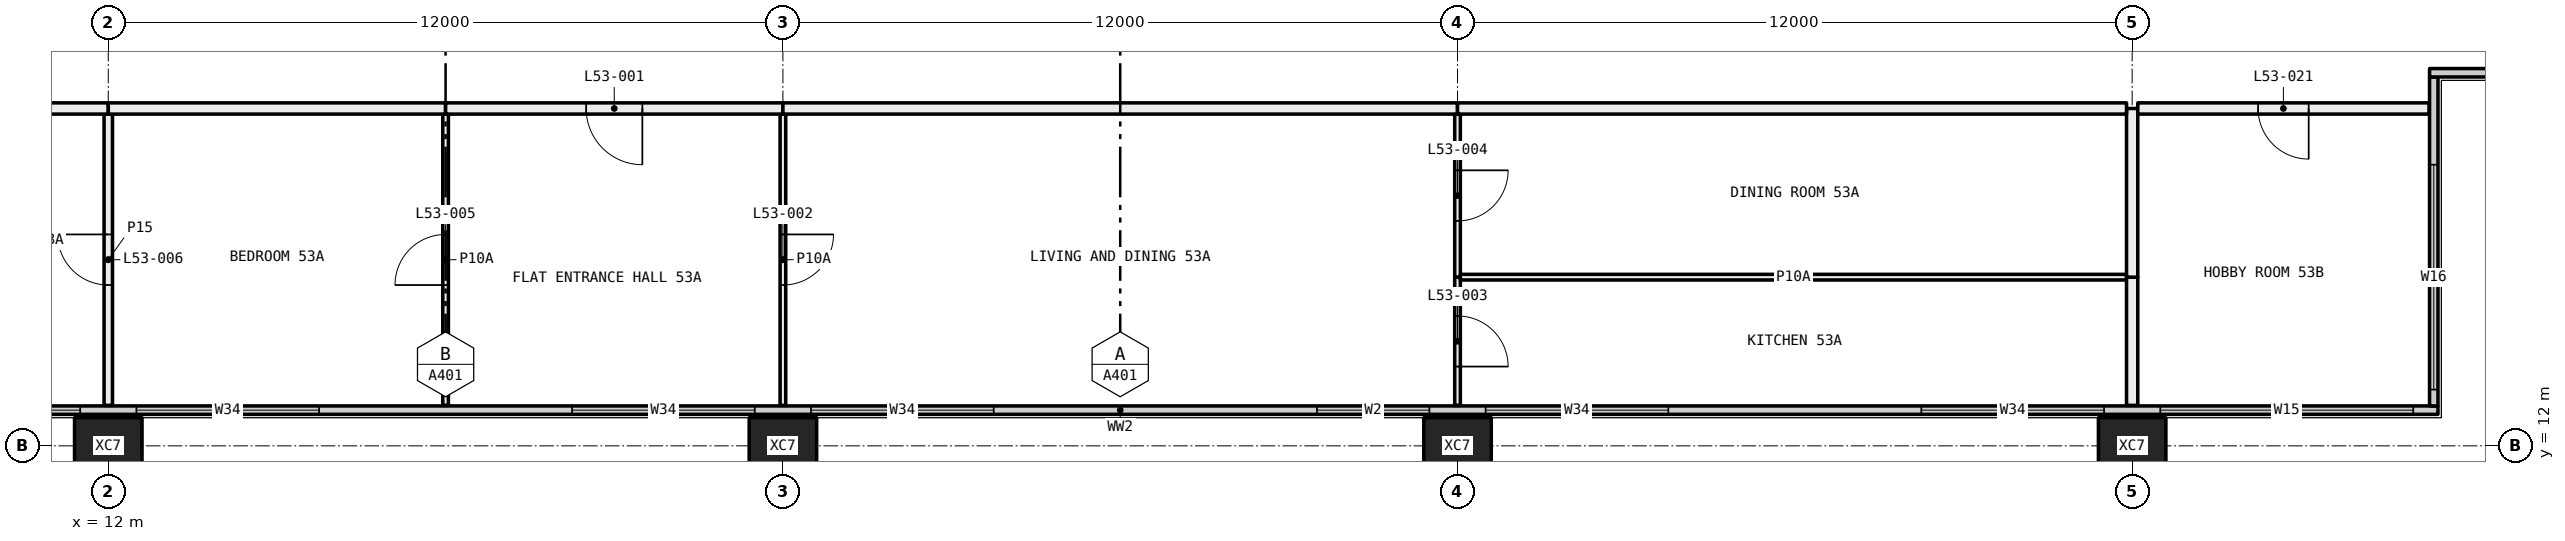
"""IFC4 building model, lengths in metres.
Left out: names, types, materials, properties, quantities, classifications, styles, units other than length and angle.
Written with IfcOpenShell. Run it as: python <this file> out.ifc"""

import sys

from ifc_helpers import new_model, si_unit, direction, frame, frame_2d, origin, origin_2d, place, context, subcontext, project, spatial, rectangle, hollow_rectangle, extrude, element, fill, save


model = new_model("IFC4")
c1 = context("Model", 3, precision=1e-05, world=origin(), true_north=direction((0.0, 1.0)))
c2 = subcontext(c1, "Body", "Model", "MODEL_VIEW")
j1 = project(units=[si_unit("LENGTHUNIT", "METRE"), si_unit("PLANEANGLEUNIT", "RADIAN")], contexts=[c1])
p1 = place(None, origin())
s1 = spatial("IfcSite", under=j1, at=p1, CompositionType="ELEMENT")
p2 = place(p1, origin())
s2 = spatial("IfcBuilding", under=s1, at=p2, CompositionType="ELEMENT")
p3 = place(p2, frame((0.0, 0.0, 199.65)))
s3 = spatial("IfcBuildingStorey", under=s2, at=p3, CompositionType="ELEMENT", Elevation=199.65)
for number, where, z_axis, x_axis in (
    (1, (12.0, 12.0, -0.4), (0.0, 0.0, 1.0), (1.0, 0.0, 0.0)),
    (2, (24.0, 12.0, -0.4), (0.0, 0.0, 1.0), (1.0, 0.0, 0.0)),
    (3, (36.0, 12.0, -0.4), (0.0, 0.0, 1.0), (1.0, 0.0, 0.0)),
    (4, (48.0, 12.0, -0.4), (0.0, 0.0, 1.0), (1.0, 0.0, 0.0)),
):
    element("IfcColumn", number, at=place(p3, frame(where, z_axis=z_axis, x_axis=x_axis)), inside=s3, PredefinedType="COLUMN", context=c2, shape_type="SweptSolid", body=[
        extrude(hollow_rectangle(XDim=1.2, YDim=1.0, WallThickness=0.045, at=origin_2d()), origin(), (0.0, 0.0, 1.0), 3.45),
    ])
p4 = place(p3, frame((6.56, 12.635, 0.0), z_axis=(0.0, 0.0, 1.0), x_axis=(1.0, 0.0, 0.0)))
e5 = element("IfcWall", 5, at=p4, inside=s3, PredefinedType="ELEMENTEDWALL", context=c2, shape_type="SweptSolid", body=[
    extrude(rectangle(XDim=46.88, YDim=0.15, at=frame_2d((23.44, 0.0))), origin(), (0.0, 0.0, 1.0), 3.05),
])
p5 = place(p4, frame((0.44, 0.0, 0.45)))
e6 = element("IfcOpeningElement", 6, at=p5, cuts=e5, PredefinedType="OPENING", context=c2, shape_type="SweptSolid", body=[
    extrude(rectangle(XDim=4.5, YDim=2.55, at=frame_2d((2.25, 1.275))), frame((0.0, 0.085, 0.0), z_axis=(0.0, -1.0, 0.0), x_axis=(1.0, 0.0, 0.0)), (0.0, 0.0, 1.0), 0.17),
])
p6 = place(p4, frame((5.94, 0.0, 0.45)))
e7 = element("IfcOpeningElement", 7, at=p6, cuts=e5, PredefinedType="OPENING", context=c2, shape_type="SweptSolid", body=[
    extrude(rectangle(XDim=3.25, YDim=2.55, at=frame_2d((1.625, 1.275))), frame((0.0, 0.085, 0.0), z_axis=(0.0, -1.0, 0.0), x_axis=(1.0, 0.0, 0.0)), (0.0, 0.0, 1.0), 0.17),
])
p7 = place(p4, frame((13.69, 0.0, 0.45)))
e8 = element("IfcOpeningElement", 8, at=p7, cuts=e5, PredefinedType="OPENING", context=c2, shape_type="SweptSolid", body=[
    extrude(rectangle(XDim=3.25, YDim=2.55, at=frame_2d((1.625, 1.275))), frame((0.0, 0.085, 0.0), z_axis=(0.0, -1.0, 0.0), x_axis=(1.0, 0.0, 0.0)), (0.0, 0.0, 1.0), 0.17),
])
p8 = place(p4, frame((17.94, 0.0, 0.45)))
e9 = element("IfcOpeningElement", 9, at=p8, cuts=e5, PredefinedType="OPENING", context=c2, shape_type="SweptSolid", body=[
    extrude(rectangle(XDim=3.25, YDim=2.55, at=frame_2d((1.625, 1.275))), frame((0.0, 0.085, 0.0), z_axis=(0.0, -1.0, 0.0), x_axis=(1.0, 0.0, 0.0)), (0.0, 0.0, 1.0), 0.17),
])
p9 = place(p4, frame((26.94, 0.0, 0.45)))
e10 = element("IfcOpeningElement", 10, at=p9, cuts=e5, PredefinedType="OPENING", context=c2, shape_type="SweptSolid", body=[
    extrude(rectangle(XDim=2.0, YDim=2.55, at=frame_2d((1.0, 1.275))), frame((0.0, 0.085, 0.0), z_axis=(0.0, -1.0, 0.0), x_axis=(1.0, 0.0, 0.0)), (0.0, 0.0, 1.0), 0.17),
])
p10 = place(p4, frame((29.94, 0.0, 0.45)))
e11 = element("IfcOpeningElement", 11, at=p10, cuts=e5, PredefinedType="OPENING", context=c2, shape_type="SweptSolid", body=[
    extrude(rectangle(XDim=3.25, YDim=2.55, at=frame_2d((1.625, 1.275))), frame((0.0, 0.085, 0.0), z_axis=(0.0, -1.0, 0.0), x_axis=(1.0, 0.0, 0.0)), (0.0, 0.0, 1.0), 0.17),
])
p11 = place(p4, frame((37.69, 0.0, 0.45)))
e12 = element("IfcOpeningElement", 12, at=p11, cuts=e5, PredefinedType="OPENING", context=c2, shape_type="SweptSolid", body=[
    extrude(rectangle(XDim=3.25, YDim=2.55, at=frame_2d((1.625, 1.275))), frame((0.0, 0.085, 0.0), z_axis=(0.0, -1.0, 0.0), x_axis=(1.0, 0.0, 0.0)), (0.0, 0.0, 1.0), 0.17),
])
p12 = place(p4, frame((41.94, 0.0, 0.45)))
e13 = element("IfcOpeningElement", 13, at=p12, cuts=e5, PredefinedType="OPENING", context=c2, shape_type="SweptSolid", body=[
    extrude(rectangle(XDim=4.5, YDim=2.55, at=frame_2d((2.25, 1.275))), frame((0.0, 0.085, 0.0), z_axis=(0.0, -1.0, 0.0), x_axis=(1.0, 0.0, 0.0)), (0.0, 0.0, 1.0), 0.17),
])
p13 = place(p3, frame((53.365, 12.71, 0.0), z_axis=(0.0, 0.0, 1.0), x_axis=(0.0, 1.0, 0.0)))
e14 = element("IfcWall", 14, at=p13, inside=s3, PredefinedType="ELEMENTEDWALL", context=c2, shape_type="SweptSolid", body=[
    extrude(rectangle(XDim=5.85, YDim=0.15, at=frame_2d((2.925, 0.0))), origin(), (0.0, 0.0, 1.0), 3.05),
])
p14 = place(p13, frame((0.29, 0.0, 0.45)))
e15 = element("IfcOpeningElement", 15, at=p14, cuts=e14, PredefinedType="OPENING", context=c2, shape_type="SweptSolid", body=[
    extrude(rectangle(XDim=4.0, YDim=2.55, at=frame_2d((2.0, 1.275))), frame((0.0, 0.085, 0.0), z_axis=(0.0, -1.0, 0.0), x_axis=(1.0, 0.0, 0.0)), (0.0, 0.0, 1.0), 0.17),
])
p15 = place(p3, frame((53.29, 18.635, 0.0), z_axis=(0.0, 0.0, 1.0), x_axis=(1.0, 0.0, 0.0)))
e16 = element("IfcWall", 16, at=p15, inside=s3, PredefinedType="ELEMENTEDWALL", context=c2, shape_type="SweptSolid", body=[
    extrude(rectangle(XDim=6.15, YDim=0.15, at=frame_2d((3.075, 0.0))), origin(), (0.0, 0.0, 1.0), 3.05),
])
p16 = place(p15, frame((1.71, 0.0, 0.45)))
e17 = element("IfcOpeningElement", 17, at=p16, cuts=e16, PredefinedType="OPENING", context=c2, shape_type="SweptSolid", body=[
    extrude(rectangle(XDim=4.0, YDim=2.55, at=frame_2d((2.0, 1.275))), frame((0.0, 0.085, 0.0), z_axis=(0.0, -1.0, 0.0), x_axis=(1.0, 0.0, 0.0)), (0.0, 0.0, 1.0), 0.17),
])
p17 = place(p3, frame((12.0, 12.72, 0.0), z_axis=(0.0, 0.0, 1.0), x_axis=(0.0, 1.0, 0.0)))
e18 = element("IfcWall", 18, at=p17, inside=s3, PredefinedType="PARTITIONING", context=c2, shape_type="SweptSolid", body=[
    extrude(rectangle(XDim=5.18, YDim=0.15, at=frame_2d((2.59, 0.0))), origin(), (0.0, 0.0, 1.0), 3.05),
])
p18 = place(p17, frame((2.14, 0.0, 0.0)))
e19 = element("IfcOpeningElement", 19, at=p18, cuts=e18, PredefinedType="OPENING", context=c2, shape_type="SweptSolid", body=[
    extrude(rectangle(XDim=0.9, YDim=2.1, at=frame_2d((0.45, 1.05))), frame((0.0, 0.085, 0.0), z_axis=(0.0, -1.0, 0.0), x_axis=(1.0, 0.0, 0.0)), (0.0, 0.0, 1.0), 0.17),
])
p19 = place(p3, frame((12.0, 18.0, 0.0), z_axis=(0.0, 0.0, 1.0), x_axis=(-1.0, 0.0, 0.0)))
e20 = element("IfcWall", 20, at=p19, inside=s3, PredefinedType="PARTITIONING", context=c2, shape_type="SweptSolid", body=[
    extrude(rectangle(XDim=1.9, YDim=0.2, at=frame_2d((0.95, 0.0))), origin(), (0.0, 0.0, 1.0), 3.05),
])
p20 = place(p3, frame((18.0, 12.72, 0.0), z_axis=(0.0, 0.0, 1.0), x_axis=(0.0, 1.0, 0.0)))
e21 = element("IfcWall", 21, at=p20, inside=s3, PredefinedType="PARTITIONING", context=c2, shape_type="SweptSolid", body=[
    extrude(rectangle(XDim=5.18, YDim=0.1, at=frame_2d((2.59, 0.0))), origin(), (0.0, 0.0, 1.0), 3.05),
])
p21 = place(p20, frame((2.14, 0.0, 0.0)))
e22 = element("IfcOpeningElement", 22, at=p21, cuts=e21, PredefinedType="OPENING", context=c2, shape_type="SweptSolid", body=[
    extrude(rectangle(XDim=0.9, YDim=2.1, at=frame_2d((0.45, 1.05))), frame((0.0, 0.06, 0.0), z_axis=(0.0, -1.0, 0.0), x_axis=(1.0, 0.0, 0.0)), (0.0, 0.0, 1.0), 0.12),
])
p22 = place(p3, frame((18.0, 18.0, 0.0), z_axis=(0.0, 0.0, 1.0), x_axis=(-1.0, 0.0, 0.0)))
e23 = element("IfcWall", 23, at=p22, inside=s3, PredefinedType="PARTITIONING", context=c2, shape_type="SweptSolid", body=[
    extrude(rectangle(XDim=6.0, YDim=0.2, at=frame_2d((3.0, 0.0))), origin(), (0.0, 0.0, 1.0), 3.05),
])
p23 = place(p3, frame((24.0, 12.72, 0.0), z_axis=(0.0, 0.0, 1.0), x_axis=(0.0, 1.0, 0.0)))
e24 = element("IfcWall", 24, at=p23, inside=s3, PredefinedType="PARTITIONING", context=c2, shape_type="SweptSolid", body=[
    extrude(rectangle(XDim=5.18, YDim=0.1, at=frame_2d((2.59, 0.0))), origin(), (0.0, 0.0, 1.0), 3.05),
])
p24 = place(p23, frame((2.14, 0.0, 0.0)))
e25 = element("IfcOpeningElement", 25, at=p24, cuts=e24, PredefinedType="OPENING", context=c2, shape_type="SweptSolid", body=[
    extrude(rectangle(XDim=0.9, YDim=2.1, at=frame_2d((0.45, 1.05))), frame((0.0, 0.06, 0.0), z_axis=(0.0, -1.0, 0.0), x_axis=(1.0, 0.0, 0.0)), (0.0, 0.0, 1.0), 0.12),
])
p25 = place(p3, frame((24.0, 18.0, 0.0), z_axis=(0.0, 0.0, 1.0), x_axis=(-1.0, 0.0, 0.0)))
e26 = element("IfcWall", 26, at=p25, inside=s3, PredefinedType="PARTITIONING", context=c2, shape_type="SweptSolid", body=[
    extrude(rectangle(XDim=6.0, YDim=0.2, at=frame_2d((3.0, 0.0))), origin(), (0.0, 0.0, 1.0), 3.05),
])
p26 = place(p25, frame((2.5, 0.0, 0.0)))
e27 = element("IfcOpeningElement", 27, at=p26, cuts=e26, PredefinedType="OPENING", context=c2, shape_type="SweptSolid", body=[
    extrude(rectangle(XDim=1.0, YDim=2.1, at=frame_2d((0.5, 1.05))), frame((0.0, 0.11, 0.0), z_axis=(0.0, -1.0, 0.0), x_axis=(1.0, 0.0, 0.0)), (0.0, 0.0, 1.0), 0.22),
])
p27 = place(p3, frame((36.0, 12.72, 0.0), z_axis=(0.0, 0.0, 1.0), x_axis=(0.0, 1.0, 0.0)))
e28 = element("IfcWall", 28, at=p27, inside=s3, PredefinedType="PARTITIONING", context=c2, shape_type="SweptSolid", body=[
    extrude(rectangle(XDim=2.28, YDim=0.1, at=frame_2d((1.14, 0.0))), origin(), (0.0, 0.0, 1.0), 2.45),
])
p28 = place(p27, frame((0.69, 0.0, 0.0)))
e29 = element("IfcOpeningElement", 29, at=p28, cuts=e28, PredefinedType="OPENING", context=c2, shape_type="SweptSolid", body=[
    extrude(rectangle(XDim=0.9, YDim=2.1, at=frame_2d((0.45, 1.05))), frame((0.0, 0.06, 0.0), z_axis=(0.0, -1.0, 0.0), x_axis=(1.0, 0.0, 0.0)), (0.0, 0.0, 1.0), 0.12),
])
p29 = place(p3, frame((36.0, 15.0, 0.0), z_axis=(0.0, 0.0, 1.0), x_axis=(0.0, 1.0, 0.0)))
e30 = element("IfcWall", 30, at=p29, inside=s3, PredefinedType="PARTITIONING", context=c2, shape_type="SweptSolid", body=[
    extrude(rectangle(XDim=2.9, YDim=0.1, at=frame_2d((1.45, 0.0))), origin(), (0.0, 0.0, 1.0), 2.45),
])
p30 = place(p29, frame((1.0, 0.0, 0.0)))
e31 = element("IfcOpeningElement", 31, at=p30, cuts=e30, PredefinedType="OPENING", context=c2, shape_type="SweptSolid", body=[
    extrude(rectangle(XDim=0.9, YDim=2.1, at=frame_2d((0.45, 1.05))), frame((0.0, 0.06, 0.0), z_axis=(0.0, -1.0, 0.0), x_axis=(1.0, 0.0, 0.0)), (0.0, 0.0, 1.0), 0.12),
])
p31 = place(p3, frame((36.0, 18.0, 0.0), z_axis=(0.0, 0.0, 1.0), x_axis=(-1.0, 0.0, 0.0)))
e32 = element("IfcWall", 32, at=p31, inside=s3, PredefinedType="PARTITIONING", context=c2, shape_type="SweptSolid", body=[
    extrude(rectangle(XDim=12.0, YDim=0.2, at=frame_2d((6.0, 0.0))), origin(), (0.0, 0.0, 1.0), 2.45),
])
p32 = place(p3, frame((47.9, 15.0, 0.0), z_axis=(0.0, 0.0, 1.0), x_axis=(-1.0, 0.0, 0.0)))
e33 = element("IfcWall", 33, at=p32, inside=s3, PredefinedType="PARTITIONING", context=c2, shape_type="SweptSolid", body=[
    extrude(rectangle(XDim=11.85, YDim=0.1, at=frame_2d((5.925, 0.0))), origin(), (0.0, 0.0, 1.0), 2.45),
])
p33 = place(p3, frame((48.0, 12.72, 0.0), z_axis=(0.0, 0.0, 1.0), x_axis=(0.0, 1.0, 0.0)))
e34 = element("IfcWall", 34, at=p33, inside=s3, PredefinedType="PARTITIONING", context=c2, shape_type="SweptSolid", body=[
    extrude(rectangle(XDim=2.28, YDim=0.2, at=frame_2d((1.14, 0.0))), origin(), (0.0, 0.0, 1.0), 3.05),
])
p34 = place(p3, frame((48.0, 15.0, 0.0), z_axis=(0.0, 0.0, 1.0), x_axis=(0.0, 1.0, 0.0)))
e35 = element("IfcWall", 35, at=p34, inside=s3, PredefinedType="PARTITIONING", context=c2, shape_type="SweptSolid", body=[
    extrude(rectangle(XDim=3.0, YDim=0.2, at=frame_2d((1.5, 0.0))), origin(), (0.0, 0.0, 1.0), 3.05),
])
p35 = place(p3, frame((47.9, 18.0, 0.0), z_axis=(0.0, 0.0, 1.0), x_axis=(-1.0, 0.0, 0.0)))
e36 = element("IfcWall", 36, at=p35, inside=s3, PredefinedType="PARTITIONING", context=c2, shape_type="SweptSolid", body=[
    extrude(rectangle(XDim=11.9, YDim=0.2, at=frame_2d((5.95, 0.0))), origin(), (0.0, 0.0, 1.0), 2.45),
])
p36 = place(p3, frame((53.28, 18.0, 0.0), z_axis=(0.0, 0.0, 1.0), x_axis=(-1.0, 0.0, 0.0)))
e37 = element("IfcWall", 37, at=p36, inside=s3, PredefinedType="PARTITIONING", context=c2, shape_type="SweptSolid", body=[
    extrude(rectangle(XDim=5.18, YDim=0.2, at=frame_2d((2.59, 0.0))), origin(), (0.0, 0.0, 1.0), 3.05),
])
p37 = place(p36, frame((2.14, 0.0, 0.0)))
e38 = element("IfcOpeningElement", 38, at=p37, cuts=e37, PredefinedType="OPENING", context=c2, shape_type="SweptSolid", body=[
    extrude(rectangle(XDim=0.9, YDim=2.1, at=frame_2d((0.45, 1.05))), frame((0.0, 0.11, 0.0), z_axis=(0.0, -1.0, 0.0), x_axis=(1.0, 0.0, 0.0)), (0.0, 0.0, 1.0), 0.22),
])
p38 = place(p5, origin())
e39 = element("IfcWindow", 39, at=p38, inside=s3, PartitioningType="SINGLE_PANEL", PredefinedType="WINDOW", context=c2, shape_type="SweptSolid", body=[
    extrude(rectangle(XDim=4.5, YDim=2.55, at=frame_2d((2.25, 1.275))), frame((0.0, 0.03, 0.0), z_axis=(0.0, -1.0, 0.0), x_axis=(1.0, 0.0, 0.0)), (0.0, 0.0, 1.0), 0.06),
])
fill(e6, e39)
p39 = place(p6, origin())
e40 = element("IfcWindow", 40, at=p39, inside=s3, PartitioningType="SINGLE_PANEL", PredefinedType="WINDOW", context=c2, shape_type="SweptSolid", body=[
    extrude(rectangle(XDim=3.25, YDim=2.55, at=frame_2d((1.625, 1.275))), frame((0.0, 0.03, 0.0), z_axis=(0.0, -1.0, 0.0), x_axis=(1.0, 0.0, 0.0)), (0.0, 0.0, 1.0), 0.06),
])
fill(e7, e40)
p40 = place(p7, origin())
e41 = element("IfcWindow", 41, at=p40, inside=s3, PartitioningType="SINGLE_PANEL", PredefinedType="WINDOW", context=c2, shape_type="SweptSolid", body=[
    extrude(rectangle(XDim=3.25, YDim=2.55, at=frame_2d((1.625, 1.275))), frame((0.0, 0.03, 0.0), z_axis=(0.0, -1.0, 0.0), x_axis=(1.0, 0.0, 0.0)), (0.0, 0.0, 1.0), 0.06),
])
fill(e8, e41)
p41 = place(p8, origin())
e42 = element("IfcWindow", 42, at=p41, inside=s3, PartitioningType="SINGLE_PANEL", PredefinedType="WINDOW", context=c2, shape_type="SweptSolid", body=[
    extrude(rectangle(XDim=3.25, YDim=2.55, at=frame_2d((1.625, 1.275))), frame((0.0, 0.03, 0.0), z_axis=(0.0, -1.0, 0.0), x_axis=(1.0, 0.0, 0.0)), (0.0, 0.0, 1.0), 0.06),
])
fill(e9, e42)
p42 = place(p9, origin())
e43 = element("IfcWindow", 43, at=p42, inside=s3, PartitioningType="SINGLE_PANEL", PredefinedType="WINDOW", context=c2, shape_type="SweptSolid", body=[
    extrude(rectangle(XDim=2.0, YDim=2.55, at=frame_2d((1.0, 1.275))), frame((0.0, 0.03, 0.0), z_axis=(0.0, -1.0, 0.0), x_axis=(1.0, 0.0, 0.0)), (0.0, 0.0, 1.0), 0.06),
])
fill(e10, e43)
p43 = place(p10, origin())
e44 = element("IfcWindow", 44, at=p43, inside=s3, PartitioningType="SINGLE_PANEL", PredefinedType="WINDOW", context=c2, shape_type="SweptSolid", body=[
    extrude(rectangle(XDim=3.25, YDim=2.55, at=frame_2d((1.625, 1.275))), frame((0.0, 0.03, 0.0), z_axis=(0.0, -1.0, 0.0), x_axis=(1.0, 0.0, 0.0)), (0.0, 0.0, 1.0), 0.06),
])
fill(e11, e44)
p44 = place(p11, origin())
e45 = element("IfcWindow", 45, at=p44, inside=s3, PartitioningType="SINGLE_PANEL", PredefinedType="WINDOW", context=c2, shape_type="SweptSolid", body=[
    extrude(rectangle(XDim=3.25, YDim=2.55, at=frame_2d((1.625, 1.275))), frame((0.0, 0.03, 0.0), z_axis=(0.0, -1.0, 0.0), x_axis=(1.0, 0.0, 0.0)), (0.0, 0.0, 1.0), 0.06),
])
fill(e12, e45)
p45 = place(p12, origin())
e46 = element("IfcWindow", 46, at=p45, inside=s3, PartitioningType="SINGLE_PANEL", PredefinedType="WINDOW", context=c2, shape_type="SweptSolid", body=[
    extrude(rectangle(XDim=4.5, YDim=2.55, at=frame_2d((2.25, 1.275))), frame((0.0, 0.03, 0.0), z_axis=(0.0, -1.0, 0.0), x_axis=(1.0, 0.0, 0.0)), (0.0, 0.0, 1.0), 0.06),
])
fill(e13, e46)
p46 = place(p14, origin())
e47 = element("IfcWindow", 47, at=p46, inside=s3, PartitioningType="SINGLE_PANEL", PredefinedType="WINDOW", context=c2, shape_type="SweptSolid", body=[
    extrude(rectangle(XDim=4.0, YDim=2.55, at=frame_2d((2.0, 1.275))), frame((0.0, 0.03, 0.0), z_axis=(0.0, -1.0, 0.0), x_axis=(1.0, 0.0, 0.0)), (0.0, 0.0, 1.0), 0.06),
])
fill(e15, e47)
p47 = place(p26, origin())
e48 = element("IfcDoor", 48, at=p47, inside=s3, OperationType="SINGLE_SWING_RIGHT", PredefinedType="DOOR", context=c2, shape_type="SweptSolid", body=[
    extrude(rectangle(XDim=1.0, YDim=2.1, at=frame_2d((0.5, 1.05))), frame((0.0, 0.025, 0.0), z_axis=(0.0, -1.0, 0.0), x_axis=(1.0, 0.0, 0.0)), (0.0, 0.0, 1.0), 0.05),
])
fill(e27, e48)
p48 = place(p24, frame((0.9, 0.0, 0.0), x_axis=(-1.0, 0.0, 0.0)))
e49 = element("IfcDoor", 49, at=p48, inside=s3, OperationType="SINGLE_SWING_RIGHT", PredefinedType="DOOR", context=c2, shape_type="SweptSolid", body=[
    extrude(rectangle(XDim=0.9, YDim=2.1, at=frame_2d((0.45, 1.05))), frame((0.0, 0.025, 0.0), z_axis=(0.0, -1.0, 0.0), x_axis=(1.0, 0.0, 0.0)), (0.0, 0.0, 1.0), 0.05),
])
fill(e25, e49)
p49 = place(p28, frame((0.9, 0.0, 0.0), x_axis=(-1.0, 0.0, 0.0)))
e50 = element("IfcDoor", 50, at=p49, inside=s3, OperationType="SINGLE_SWING_LEFT", PredefinedType="DOOR", context=c2, shape_type="SweptSolid", body=[
    extrude(rectangle(XDim=0.9, YDim=2.1, at=frame_2d((0.45, 1.05))), frame((0.0, 0.025, 0.0), z_axis=(0.0, -1.0, 0.0), x_axis=(1.0, 0.0, 0.0)), (0.0, 0.0, 1.0), 0.05),
])
fill(e29, e50)
p50 = place(p30, frame((0.9, 0.0, 0.0), x_axis=(-1.0, 0.0, 0.0)))
e51 = element("IfcDoor", 51, at=p50, inside=s3, OperationType="SINGLE_SWING_RIGHT", PredefinedType="DOOR", context=c2, shape_type="SweptSolid", body=[
    extrude(rectangle(XDim=0.9, YDim=2.1, at=frame_2d((0.45, 1.05))), frame((0.0, 0.025, 0.0), z_axis=(0.0, -1.0, 0.0), x_axis=(1.0, 0.0, 0.0)), (0.0, 0.0, 1.0), 0.05),
])
fill(e31, e51)
p51 = place(p21, origin())
e52 = element("IfcDoor", 52, at=p51, inside=s3, OperationType="SINGLE_SWING_RIGHT", PredefinedType="DOOR", context=c2, shape_type="SweptSolid", body=[
    extrude(rectangle(XDim=0.9, YDim=2.1, at=frame_2d((0.45, 1.05))), frame((0.0, 0.025, 0.0), z_axis=(0.0, -1.0, 0.0), x_axis=(1.0, 0.0, 0.0)), (0.0, 0.0, 1.0), 0.05),
])
fill(e22, e52)
p52 = place(p18, origin())
e53 = element("IfcDoor", 53, at=p52, inside=s3, OperationType="SINGLE_SWING_LEFT", PredefinedType="DOOR", context=c2, shape_type="SweptSolid", body=[
    extrude(rectangle(XDim=0.9, YDim=2.1, at=frame_2d((0.45, 1.05))), frame((0.0, 0.025, 0.0), z_axis=(0.0, -1.0, 0.0), x_axis=(1.0, 0.0, 0.0)), (0.0, 0.0, 1.0), 0.05),
])
fill(e19, e53)
p53 = place(p37, origin())
e54 = element("IfcDoor", 54, at=p53, inside=s3, OperationType="SINGLE_SWING_RIGHT", PredefinedType="DOOR", context=c2, shape_type="SweptSolid", body=[
    extrude(rectangle(XDim=0.9, YDim=2.1, at=frame_2d((0.45, 1.05))), frame((0.0, 0.025, 0.0), z_axis=(0.0, -1.0, 0.0), x_axis=(1.0, 0.0, 0.0)), (0.0, 0.0, 1.0), 0.05),
])
fill(e38, e54)
save(model, sys.argv[1])
